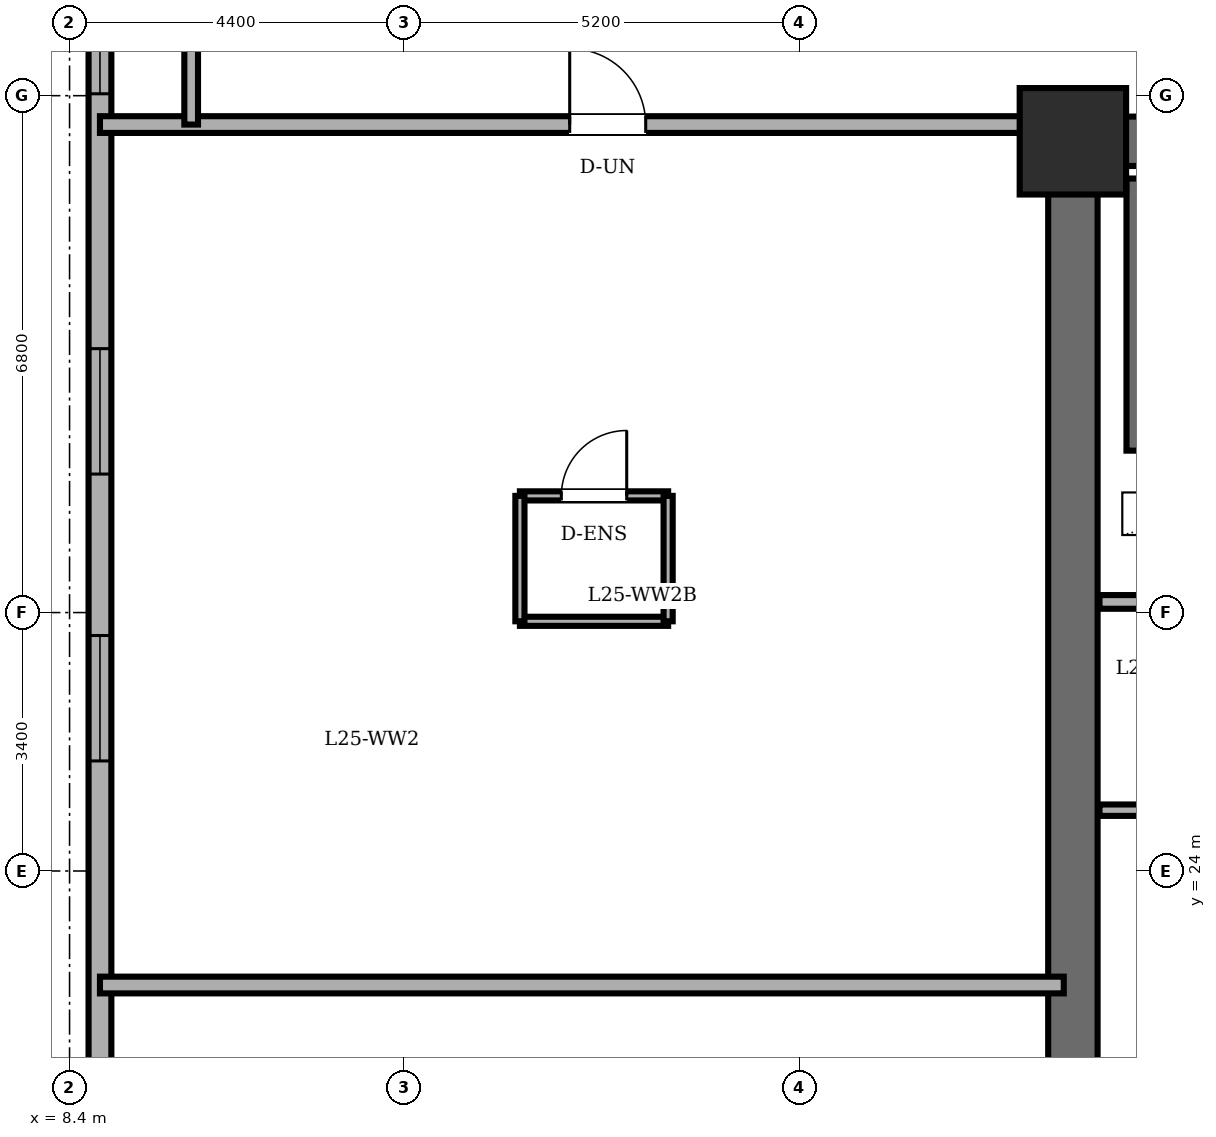
"""IFC4 building model, lengths in metres.
Left out: names, types, materials, properties, quantities, classifications, styles, units other than length and angle.
Written with IfcOpenShell. Run it as: python <this file> out.ifc"""

import sys

from ifc_helpers import new_model, si_unit, direction, frame, frame_2d, origin, origin_2d, place, context, subcontext, project, spatial, rectangle, extrude, element, fill, save


model = new_model("IFC4")
c1 = context("Model", 3, precision=1e-05, world=origin(), true_north=direction((0.0, 1.0)))
c2 = subcontext(c1, "Body", "Model", "MODEL_VIEW")
j1 = project(units=[si_unit("LENGTHUNIT", "METRE"), si_unit("PLANEANGLEUNIT", "RADIAN")], contexts=[c1])
p1 = place(None, origin())
s1 = spatial("IfcSite", under=j1, at=p1, CompositionType="ELEMENT")
p2 = place(p1, origin())
s2 = spatial("IfcBuilding", under=s1, at=p2, CompositionType="ELEMENT")
p3 = place(p2, frame((0.0, 0.0, 97.1)))
s3 = spatial("IfcBuildingStorey", under=s2, at=p3, CompositionType="ELEMENT", Elevation=97.1)
p4 = place(p3, frame((21.6, 33.6, 0.0), z_axis=(0.0, 0.0, 1.0), x_axis=(1.0, 0.0, 0.0)))
e1 = element("IfcColumn", 1, at=p4, inside=s3, PredefinedType="COLUMN", context=c2, shape_type="SweptSolid", body=[
    extrude(rectangle(XDim=1.4, YDim=1.4, at=origin_2d()), origin(), (0.0, 0.0, 1.0), 3.6),
])
p5 = place(p3, frame((8.8, 38.2, 0.0), z_axis=(0.0, 0.0, 1.0), x_axis=(0.0, -1.0, 0.0)))
e2 = element("IfcWall", 2, at=p5, inside=s3, PredefinedType="SOLIDWALL", context=c2, shape_type="SweptSolid", body=[
    extrude(rectangle(XDim=28.4, YDim=0.3, at=frame_2d((14.2, 0.0))), origin(), (0.0, 0.0, 1.0), 3.4),
])
p6 = place(p5, frame((2.325, 0.0, 0.85)))
e3 = element("IfcOpeningElement", 3, at=p6, cuts=e2, PredefinedType="OPENING", context=c2, shape_type="SweptSolid", body=[
    extrude(rectangle(XDim=1.65, YDim=1.55, at=frame_2d((0.825, 0.775))), frame((0.0, 0.16, 0.0), z_axis=(0.0, -1.0, 0.0), x_axis=(1.0, 0.0, 0.0)), (0.0, 0.0, 1.0), 0.32),
])
p7 = place(p5, frame((7.328, 0.0, 0.85)))
e4 = element("IfcOpeningElement", 4, at=p7, cuts=e2, PredefinedType="OPENING", context=c2, shape_type="SweptSolid", body=[
    extrude(rectangle(XDim=1.65, YDim=1.55, at=frame_2d((0.825, 0.775))), frame((0.0, 0.16, 0.0), z_axis=(0.0, -1.0, 0.0), x_axis=(1.0, 0.0, 0.0)), (0.0, 0.0, 1.0), 0.32),
])
p8 = place(p5, frame((11.102, 0.0, 0.85)))
e5 = element("IfcOpeningElement", 5, at=p8, cuts=e2, PredefinedType="OPENING", context=c2, shape_type="SweptSolid", body=[
    extrude(rectangle(XDim=1.65, YDim=1.55, at=frame_2d((0.825, 0.775))), frame((0.0, 0.16, 0.0), z_axis=(0.0, -1.0, 0.0), x_axis=(1.0, 0.0, 0.0)), (0.0, 0.0, 1.0), 0.32),
])
p9 = place(p5, frame((17.648, 0.0, 0.85)))
e6 = element("IfcOpeningElement", 6, at=p9, cuts=e2, PredefinedType="OPENING", context=c2, shape_type="SweptSolid", body=[
    extrude(rectangle(XDim=1.65, YDim=1.55, at=frame_2d((0.825, 0.775))), frame((0.0, 0.16, 0.0), z_axis=(0.0, -1.0, 0.0), x_axis=(1.0, 0.0, 0.0)), (0.0, 0.0, 1.0), 0.32),
])
p10 = place(p5, frame((20.422, 0.0, 0.85)))
e7 = element("IfcOpeningElement", 7, at=p10, cuts=e2, PredefinedType="OPENING", context=c2, shape_type="SweptSolid", body=[
    extrude(rectangle(XDim=1.65, YDim=1.55, at=frame_2d((0.825, 0.775))), frame((0.0, 0.16, 0.0), z_axis=(0.0, -1.0, 0.0), x_axis=(1.0, 0.0, 0.0)), (0.0, 0.0, 1.0), 0.32),
])
p11 = place(p5, frame((24.425, 0.0, 0.85)))
e8 = element("IfcOpeningElement", 8, at=p11, cuts=e2, PredefinedType="OPENING", context=c2, shape_type="SweptSolid", body=[
    extrude(rectangle(XDim=1.65, YDim=1.55, at=frame_2d((0.825, 0.775))), frame((0.0, 0.16, 0.0), z_axis=(0.0, -1.0, 0.0), x_axis=(1.0, 0.0, 0.0)), (0.0, 0.0, 1.0), 0.32),
])
p12 = place(p3, frame((21.6, 14.4, 0.0), z_axis=(0.0, 0.0, 1.0), x_axis=(0.0, 1.0, 0.0)))
e9 = element("IfcWall", 9, at=p12, inside=s3, PredefinedType="SHEAR", context=c2, shape_type="SweptSolid", body=[
    extrude(rectangle(XDim=19.2, YDim=0.65, at=frame_2d((9.6, 0.0))), origin(), (0.0, 0.0, 1.0), 3.4),
])
p13 = place(p3, frame((21.6, 33.6, 0.0), z_axis=(0.0, 0.0, 1.0), x_axis=(1.0, 0.0, 0.0)))
e10 = element("IfcWall", 10, at=p13, inside=s3, PredefinedType="SHEAR", context=c2, shape_type="SweptSolid", body=[
    extrude(rectangle(XDim=15.6, YDim=0.65, at=frame_2d((7.8, 0.0))), origin(), (0.0, 0.0, 1.0), 3.4),
])
p14 = place(p3, frame((22.48, 29.53, 0.0), z_axis=(0.0, 0.0, 1.0), x_axis=(0.0, 1.0, 0.0)))
e11 = element("IfcWall", 11, at=p14, inside=s3, PredefinedType="SOLIDWALL", context=c2, shape_type="SweptSolid", body=[
    extrude(rectangle(XDim=3.58, YDim=0.35, at=frame_2d((1.79, 0.0))), origin(), (0.0, 0.0, 1.0), 3.4),
])
p15 = place(p3, frame((21.95, 27.54, 0.0), z_axis=(0.0, 0.0, 1.0), x_axis=(1.0, 0.0, 0.0)))
e12 = element("IfcWall", 12, at=p15, inside=s3, PredefinedType="PARTITIONING", context=c2, shape_type="SweptSolid", body=[
    extrude(rectangle(XDim=10.56, YDim=0.18, at=frame_2d((5.28, 0.0))), origin(), (0.0, 0.0, 1.0), 3.4),
])
p16 = place(p3, frame((21.95, 24.8, 0.0), z_axis=(0.0, 0.0, 1.0), x_axis=(1.0, 0.0, 0.0)))
e13 = element("IfcWall", 13, at=p16, inside=s3, PredefinedType="PARTITIONING", context=c2, shape_type="SweptSolid", body=[
    extrude(rectangle(XDim=2.51, YDim=0.15, at=frame_2d((1.255, 0.0))), origin(), (0.0, 0.0, 1.0), 3.4),
])
p17 = place(p3, frame((14.325, 28.935, 0.0), z_axis=(0.0, 0.0, 1.0), x_axis=(1.0, 0.0, 0.0)))
e14 = element("IfcWall", 14, at=p17, inside=s3, PredefinedType="PARTITIONING", context=c2, shape_type="SweptSolid", body=[
    extrude(rectangle(XDim=1.95, YDim=0.12, at=frame_2d((0.975, 0.0))), origin(), (0.0, 0.0, 1.0), 3.4),
])
p18 = place(p17, frame((0.545, 0.0, 0.0)))
e15 = element("IfcOpeningElement", 15, at=p18, cuts=e14, PredefinedType="OPENING", context=c2, shape_type="SweptSolid", body=[
    extrude(rectangle(XDim=0.86, YDim=2.1, at=frame_2d((0.43, 1.05))), frame((0.0, 0.07, 0.0), z_axis=(0.0, -1.0, 0.0), x_axis=(1.0, 0.0, 0.0)), (0.0, 0.0, 1.0), 0.14),
])
p19 = place(p3, frame((16.275, 27.285, 0.0), z_axis=(0.0, 0.0, 1.0), x_axis=(-1.0, 0.0, 0.0)))
e16 = element("IfcWall", 16, at=p19, inside=s3, PredefinedType="PARTITIONING", context=c2, shape_type="SweptSolid", body=[
    extrude(rectangle(XDim=1.95, YDim=0.12, at=frame_2d((0.975, 0.0))), origin(), (0.0, 0.0, 1.0), 3.4),
])
for number, where, z_axis, x_axis in (
    (17, (14.325, 28.935, 0.0), (0.0, 0.0, 1.0), (0.0, -1.0, 0.0)),
    (18, (16.275, 27.285, 0.0), (0.0, 0.0, 1.0), (0.0, 1.0, 0.0)),
):
    element("IfcWall", number, at=place(p3, frame(where, z_axis=z_axis, x_axis=x_axis)), inside=s3, PredefinedType="PARTITIONING", context=c2, shape_type="SweptSolid", body=[
        extrude(rectangle(XDim=1.65, YDim=0.12, at=frame_2d((0.825, 0.0))), origin(), (0.0, 0.0, 1.0), 3.4),
    ])
p20 = place(p3, frame((8.8, 22.5, 0.0), z_axis=(0.0, 0.0, 1.0), x_axis=(1.0, 0.0, 0.0)))
e19 = element("IfcWall", 19, at=p20, inside=s3, PredefinedType="PARTITIONING", context=c2, shape_type="SweptSolid", body=[
    extrude(rectangle(XDim=12.68, YDim=0.22, at=frame_2d((6.34, 0.0))), origin(), (0.0, 0.0, 1.0), 3.4),
])
p21 = place(p3, frame((8.8, 33.82, 0.0), z_axis=(0.0, 0.0, 1.0), x_axis=(1.0, 0.0, 0.0)))
e20 = element("IfcWall", 20, at=p21, inside=s3, PredefinedType="PARTITIONING", context=c2, shape_type="SweptSolid", body=[
    extrude(rectangle(XDim=12.68, YDim=0.22, at=frame_2d((6.34, 0.0))), origin(), (0.0, 0.0, 1.0), 3.4),
])
p22 = place(p21, frame((6.18, 0.0, 0.0)))
e21 = element("IfcOpeningElement", 21, at=p22, cuts=e20, PredefinedType="OPENING", context=c2, shape_type="SweptSolid", body=[
    extrude(rectangle(XDim=1.0, YDim=2.15, at=frame_2d((0.5, 1.075))), frame((0.0, 0.12, 0.0), z_axis=(0.0, -1.0, 0.0), x_axis=(1.0, 0.0, 0.0)), (0.0, 0.0, 1.0), 0.24),
])
p23 = place(p3, frame((10.0, 33.82, 0.0), z_axis=(0.0, 0.0, 1.0), x_axis=(0.0, 1.0, 0.0)))
e22 = element("IfcWall", 22, at=p23, inside=s3, PredefinedType="PARTITIONING", context=c2, shape_type="SweptSolid", body=[
    extrude(rectangle(XDim=2.46, YDim=0.18, at=frame_2d((1.23, 0.0))), origin(), (0.0, 0.0, 1.0), 3.4),
])
p24 = place(p6, origin())
e23 = element("IfcWindow", 23, at=p24, inside=s3, PartitioningType="DOUBLE_PANEL_VERTICAL", PredefinedType="WINDOW", context=c2, shape_type="SweptSolid", body=[
    extrude(rectangle(XDim=1.65, YDim=1.55, at=frame_2d((0.825, 0.775))), frame((0.0, 0.03, 0.0), z_axis=(0.0, -1.0, 0.0), x_axis=(1.0, 0.0, 0.0)), (0.0, 0.0, 1.0), 0.06),
])
fill(e3, e23)
p25 = place(p7, origin())
e24 = element("IfcWindow", 24, at=p25, inside=s3, PartitioningType="DOUBLE_PANEL_VERTICAL", PredefinedType="WINDOW", context=c2, shape_type="SweptSolid", body=[
    extrude(rectangle(XDim=1.65, YDim=1.55, at=frame_2d((0.825, 0.775))), frame((0.0, 0.03, 0.0), z_axis=(0.0, -1.0, 0.0), x_axis=(1.0, 0.0, 0.0)), (0.0, 0.0, 1.0), 0.06),
])
fill(e4, e24)
p26 = place(p8, origin())
e25 = element("IfcWindow", 25, at=p26, inside=s3, PartitioningType="DOUBLE_PANEL_VERTICAL", PredefinedType="WINDOW", context=c2, shape_type="SweptSolid", body=[
    extrude(rectangle(XDim=1.65, YDim=1.55, at=frame_2d((0.825, 0.775))), frame((0.0, 0.03, 0.0), z_axis=(0.0, -1.0, 0.0), x_axis=(1.0, 0.0, 0.0)), (0.0, 0.0, 1.0), 0.06),
])
fill(e5, e25)
p27 = place(p18, origin())
e26 = element("IfcDoor", 26, at=p27, inside=s3, OperationType="SINGLE_SWING_RIGHT", PredefinedType="DOOR", context=c2, shape_type="SweptSolid", body=[
    extrude(rectangle(XDim=0.86, YDim=2.1, at=frame_2d((0.43, 1.05))), frame((0.0, 0.025, 0.0), z_axis=(0.0, -1.0, 0.0), x_axis=(1.0, 0.0, 0.0)), (0.0, 0.0, 1.0), 0.05),
])
fill(e15, e26)
p28 = place(p22, origin())
e27 = element("IfcDoor", 27, at=p28, inside=s3, OperationType="SINGLE_SWING_LEFT", PredefinedType="DOOR", context=c2, shape_type="SweptSolid", body=[
    extrude(rectangle(XDim=1.0, YDim=2.15, at=frame_2d((0.5, 1.075))), frame((0.0, 0.025, 0.0), z_axis=(0.0, -1.0, 0.0), x_axis=(1.0, 0.0, 0.0)), (0.0, 0.0, 1.0), 0.05),
])
fill(e21, e27)
save(model, sys.argv[1])
